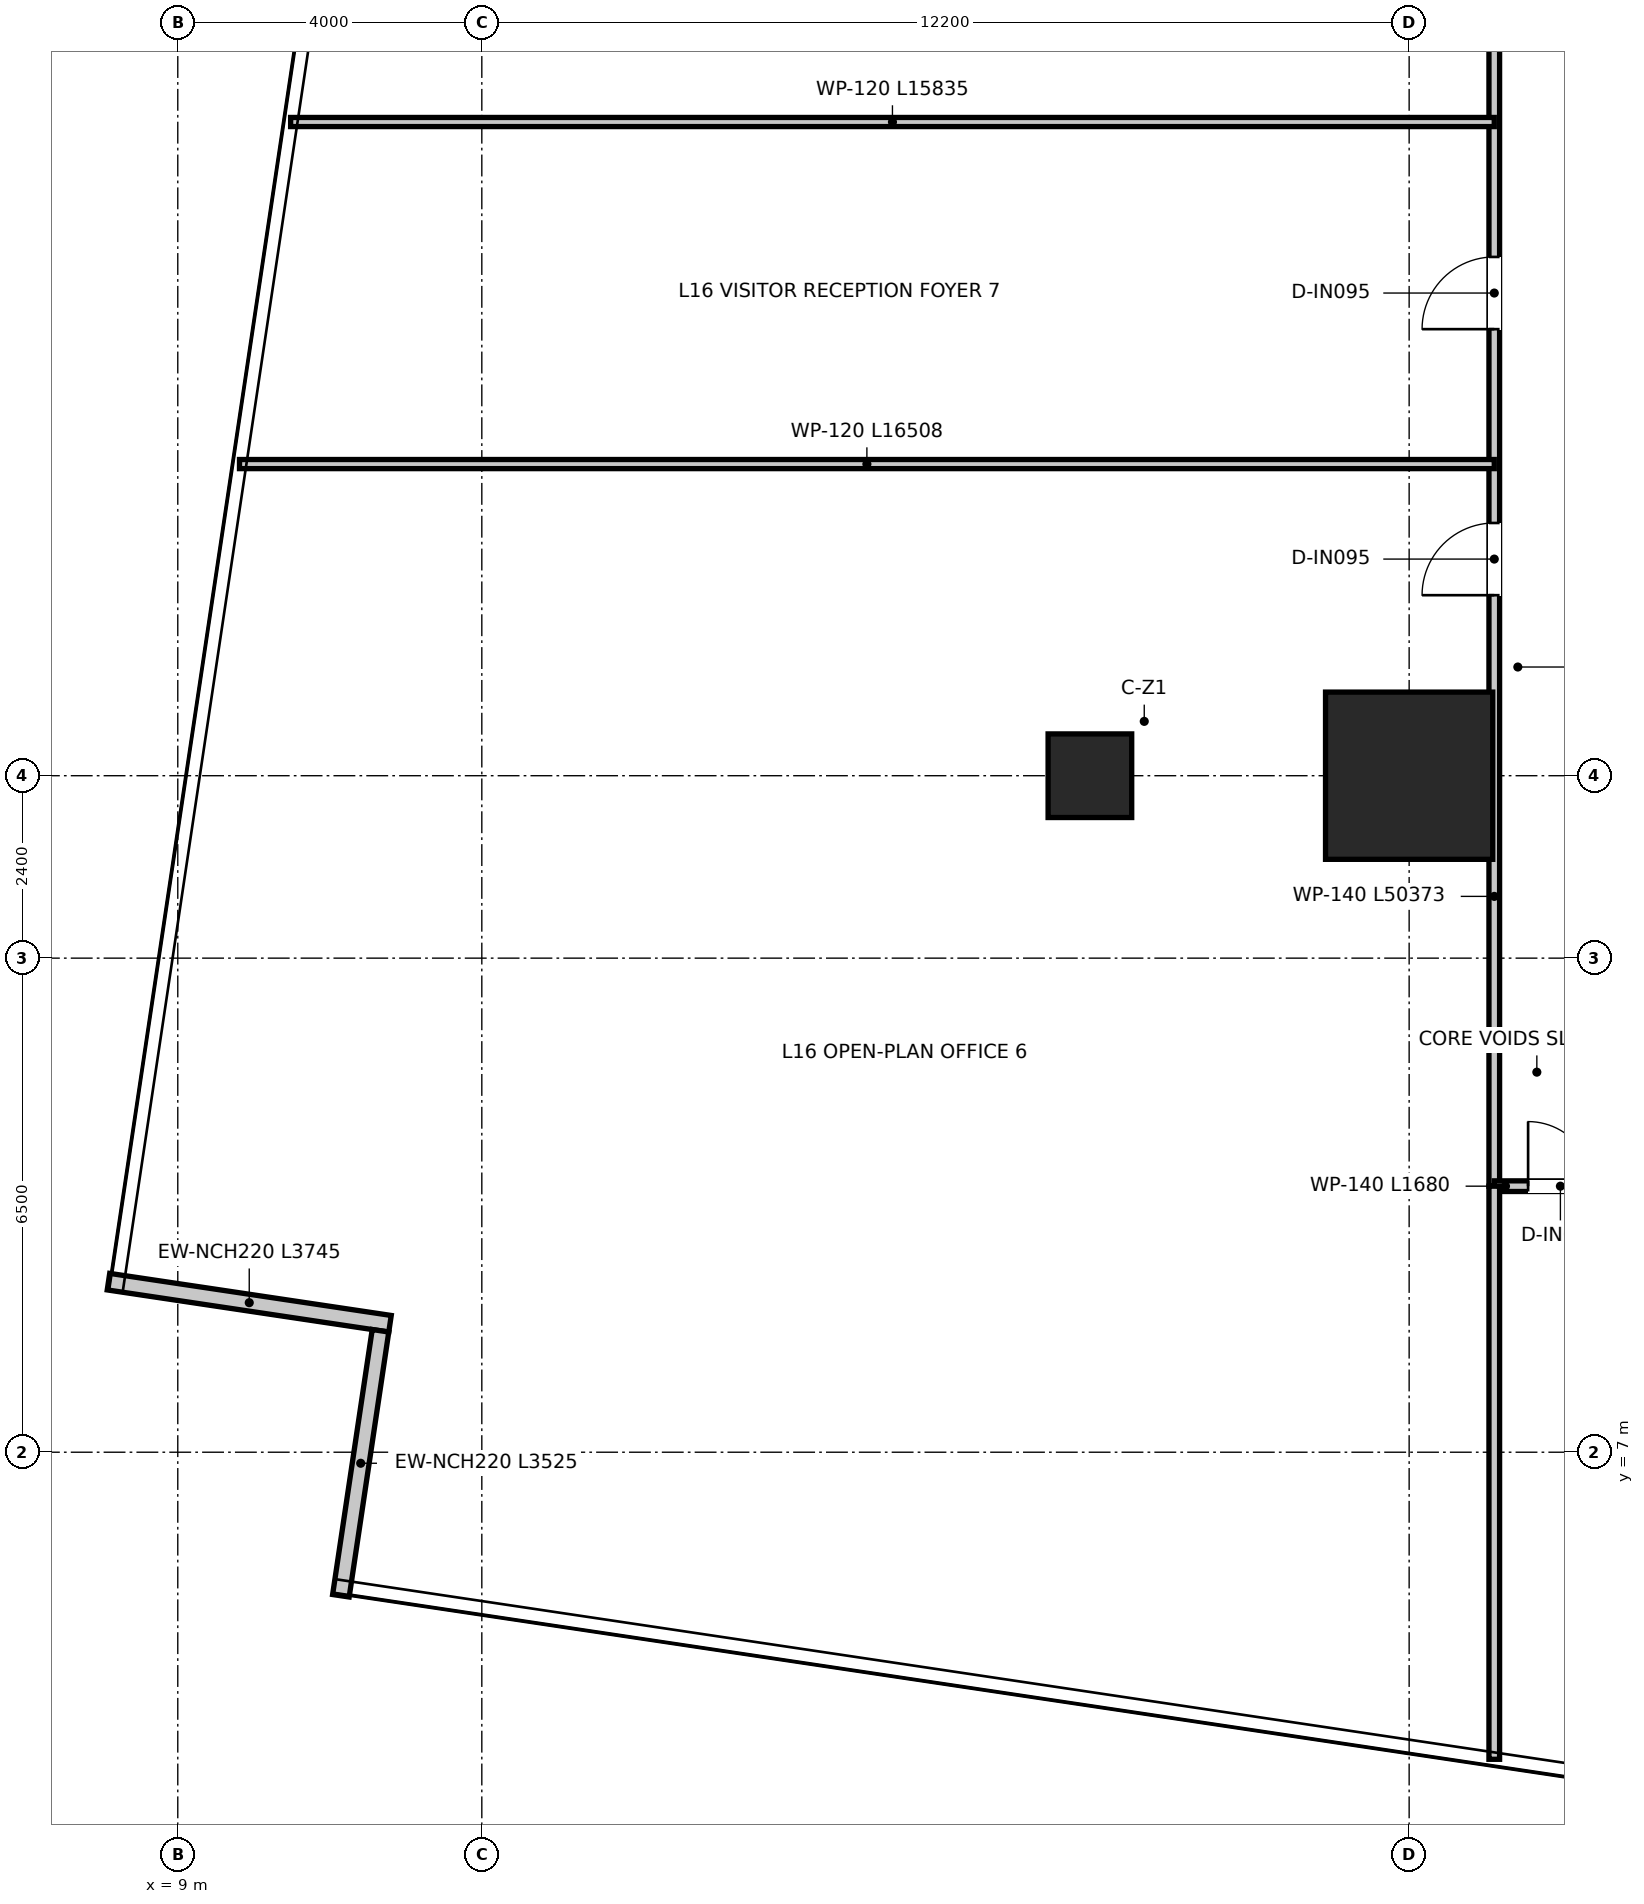
"""IFC4 building model, lengths in metres.
Left out: names, types, materials, properties, quantities, classifications, styles, units other than length and angle.
Written with IfcOpenShell. Run it as: python <this file> out.ifc"""

import sys

from ifc_helpers import new_model, si_unit, direction, frame, frame_2d, origin, origin_2d, place, context, subcontext, project, spatial, rectangle, extrude, source, transform, mapped, element, fill, save


model = new_model("IFC4")
c1 = context("Model", 3, precision=1e-05, world=origin(), true_north=direction((0.0, 1.0)))
c2 = subcontext(c1, "Body", "Model", "MODEL_VIEW")
j1 = project(units=[si_unit("LENGTHUNIT", "METRE"), si_unit("PLANEANGLEUNIT", "RADIAN")], contexts=[c1])
p1 = place(None, origin())
s1 = spatial("IfcSite", under=j1, at=p1, CompositionType="ELEMENT")
p2 = place(p1, origin())
s2 = spatial("IfcBuilding", under=s1, at=p2, CompositionType="ELEMENT")
p3 = place(p2, frame((0.0, 0.0, 68.45)))
s3 = spatial("IfcBuildingStorey", under=s2, at=p3, CompositionType="ELEMENT", Elevation=68.45)
m1 = source(origin(), c2, "Body", "SweptSolid", [
    extrude(rectangle(XDim=2.2, YDim=2.2, at=origin_2d()), origin(), (0.0, 0.0, 1.0), 3.95),
])
p4 = place(p3, frame((25.2, 15.9, 0.0), z_axis=(0.0, 0.0, 1.0), x_axis=(1.0, 0.0, 0.0)))
e1 = element("IfcColumn", 1, at=p4, inside=s3, PredefinedType="USERDEFINED", context=c2, shape_type="MappedRepresentation", body=[
    mapped(m1, transform((0.0, 0.0, 0.0), x_axis=(1.0, 0.0, 0.0), y_axis=(0.0, 1.0, 0.0), z_axis=(0.0, 0.0, 1.0), scale=1.0)),
])
m2 = source(origin(), c2, "Body", "SweptSolid", [
    extrude(rectangle(XDim=1.1, YDim=1.1, at=origin_2d()), origin(), (0.0, 0.0, 1.0), 3.95),
])
p5 = place(p3, frame((21.0, 15.9, 0.0), z_axis=(0.0, 0.0, 1.0), x_axis=(1.0, 0.0, 0.0)))
e2 = element("IfcColumn", 2, at=p5, inside=s3, PredefinedType="COLUMN", context=c2, shape_type="MappedRepresentation", body=[
    mapped(m2, transform((0.0, 0.0, 0.0), x_axis=(1.0, 0.0, 0.0), y_axis=(0.0, 1.0, 0.0), z_axis=(0.0, 0.0, 1.0), scale=1.0)),
])
p6 = place(p3, frame((8.088, 9.244, 0.0), z_axis=(0.0, 0.0, 1.0), x_axis=(0.989018923648, -0.147788932826, 0.0)))
e3 = element("IfcWall", 3, at=p6, inside=s3, PredefinedType="ELEMENTEDWALL", context=c2, shape_type="SweptSolid", body=[
    extrude(rectangle(XDim=3.745, YDim=0.22, at=frame_2d((1.873, 0.0))), origin(), (0.0, 0.0, 1.0), 3.67),
])
p7 = place(p3, frame((11.667, 8.598, 0.0), z_axis=(0.0, 0.0, 1.0), x_axis=(-0.147798551521, -0.98901748628, 0.0)))
e4 = element("IfcWall", 4, at=p7, inside=s3, PredefinedType="ELEMENTEDWALL", context=c2, shape_type="SweptSolid", body=[
    extrude(rectangle(XDim=3.525, YDim=0.22, at=frame_2d((1.763, 0.0))), origin(), (0.0, 0.0, 1.0), 3.67),
])
p8 = place(p3, frame((26.32, 10.5, 0.0), z_axis=(0.0, 0.0, 1.0), x_axis=(0.0, 1.0, 0.0)))
e5 = element("IfcWall", 5, at=p8, inside=s3, PredefinedType="PARTITIONING", context=c2, shape_type="SweptSolid", body=[
    extrude(rectangle(XDim=25.62, YDim=0.14, at=frame_2d((12.81, 0.0))), origin(), (0.0, 0.0, 1.0), 2.97),
])
p9 = place(p8, frame((7.775, 0.0, 0.0)))
e6 = element("IfcOpeningElement", 6, at=p9, cuts=e5, PredefinedType="OPENING", context=c2, shape_type="SweptSolid", body=[
    extrude(rectangle(XDim=0.95, YDim=2.1, at=frame_2d((0.475, 1.05))), frame((0.0, 0.08, 0.0), z_axis=(0.0, -1.0, 0.0), x_axis=(1.0, 0.0, 0.0)), (0.0, 0.0, 1.0), 0.16),
])
p10 = place(p8, frame((11.275, 0.0, 0.0)))
e7 = element("IfcOpeningElement", 7, at=p10, cuts=e5, PredefinedType="OPENING", context=c2, shape_type="SweptSolid", body=[
    extrude(rectangle(XDim=0.95, YDim=2.1, at=frame_2d((0.475, 1.05))), frame((0.0, 0.08, 0.0), z_axis=(0.0, -1.0, 0.0), x_axis=(1.0, 0.0, 0.0)), (0.0, 0.0, 1.0), 0.16),
])
p11 = place(p8, frame((15.775, 0.0, 0.0)))
e8 = element("IfcOpeningElement", 8, at=p11, cuts=e5, PredefinedType="OPENING", context=c2, shape_type="SweptSolid", body=[
    extrude(rectangle(XDim=0.95, YDim=2.1, at=frame_2d((0.475, 1.05))), frame((0.0, 0.08, 0.0), z_axis=(0.0, -1.0, 0.0), x_axis=(1.0, 0.0, 0.0)), (0.0, 0.0, 1.0), 0.16),
])
p12 = place(p8, frame((20.125, 0.0, 0.0)))
e9 = element("IfcOpeningElement", 9, at=p12, cuts=e5, PredefinedType="OPENING", context=c2, shape_type="SweptSolid", body=[
    extrude(rectangle(XDim=0.95, YDim=2.1, at=frame_2d((0.475, 1.05))), frame((0.0, 0.08, 0.0), z_axis=(0.0, -1.0, 0.0), x_axis=(1.0, 0.0, 0.0)), (0.0, 0.0, 1.0), 0.16),
])
p13 = place(p8, frame((22.975, 0.0, 0.0)))
e10 = element("IfcOpeningElement", 10, at=p13, cuts=e5, PredefinedType="OPENING", context=c2, shape_type="SweptSolid", body=[
    extrude(rectangle(XDim=0.95, YDim=2.1, at=frame_2d((0.475, 1.05))), frame((0.0, 0.08, 0.0), z_axis=(0.0, -1.0, 0.0), x_axis=(1.0, 0.0, 0.0)), (0.0, 0.0, 1.0), 0.16),
])
p14 = place(p3, frame((26.32, 10.5, 0.0), z_axis=(0.0, 0.0, 1.0), x_axis=(1.0, 0.0, 0.0)))
e11 = element("IfcWall", 11, at=p14, inside=s3, PredefinedType="PARTITIONING", context=c2, shape_type="SweptSolid", body=[
    extrude(rectangle(XDim=1.68, YDim=0.14, at=frame_2d((0.84, 0.0))), origin(), (0.0, 0.0, 1.0), 3.67),
])
p15 = place(p14, frame((0.445, 0.0, 0.0)))
e12 = element("IfcOpeningElement", 12, at=p15, cuts=e11, PredefinedType="OPENING", context=c2, shape_type="SweptSolid", body=[
    extrude(rectangle(XDim=0.85, YDim=2.1, at=frame_2d((0.425, 1.05))), frame((0.0, 0.08, 0.0), z_axis=(0.0, -1.0, 0.0), x_axis=(1.0, 0.0, 0.0)), (0.0, 0.0, 1.0), 0.16),
])
p16 = place(p3, frame((26.32, 2.96, 0.0), z_axis=(0.0, 0.0, 1.0), x_axis=(0.0, 1.0, 0.0)))
e13 = element("IfcWall", 13, at=p16, inside=s3, PredefinedType="PARTITIONING", context=c2, shape_type="SweptSolid", body=[
    extrude(rectangle(XDim=7.54, YDim=0.14, at=frame_2d((3.77, 0.0))), origin(), (0.0, 0.0, 1.0), 3.67),
])
p17 = place(p3, frame((9.812, 20.0, 0.0), z_axis=(0.0, 0.0, 1.0), x_axis=(1.0, 0.0, 0.0)))
e14 = element("IfcWall", 14, at=p17, inside=s3, PredefinedType="PARTITIONING", context=c2, shape_type="SweptSolid", body=[
    extrude(rectangle(XDim=16.508, YDim=0.12, at=frame_2d((8.254, 0.0))), origin(), (0.0, 0.0, 1.0), 2.97),
])
p18 = place(p3, frame((10.485, 24.5, 0.0), z_axis=(0.0, 0.0, 1.0), x_axis=(1.0, 0.0, 0.0)))
e15 = element("IfcWall", 15, at=p18, inside=s3, PredefinedType="PARTITIONING", context=c2, shape_type="SweptSolid", body=[
    extrude(rectangle(XDim=15.835, YDim=0.12, at=frame_2d((7.918, 0.0))), origin(), (0.0, 0.0, 1.0), 2.97),
])
p19 = place(p9, origin())
e16 = element("IfcDoor", 16, at=p19, inside=s3, OperationType="SINGLE_SWING_LEFT", PredefinedType="DOOR", context=c2, shape_type="SweptSolid", body=[
    extrude(rectangle(XDim=0.95, YDim=2.1, at=frame_2d((0.475, 1.05))), frame((0.0, 0.025, 0.0), z_axis=(0.0, -1.0, 0.0), x_axis=(1.0, 0.0, 0.0)), (0.0, 0.0, 1.0), 0.05),
])
fill(e6, e16)
p20 = place(p10, origin())
e17 = element("IfcDoor", 17, at=p20, inside=s3, OperationType="SINGLE_SWING_LEFT", PredefinedType="DOOR", context=c2, shape_type="SweptSolid", body=[
    extrude(rectangle(XDim=0.95, YDim=2.1, at=frame_2d((0.475, 1.05))), frame((0.0, 0.025, 0.0), z_axis=(0.0, -1.0, 0.0), x_axis=(1.0, 0.0, 0.0)), (0.0, 0.0, 1.0), 0.05),
])
fill(e7, e17)
p21 = place(p15, origin())
e18 = element("IfcDoor", 18, at=p21, inside=s3, OperationType="SINGLE_SWING_LEFT", PredefinedType="DOOR", context=c2, shape_type="SweptSolid", body=[
    extrude(rectangle(XDim=0.85, YDim=2.1, at=frame_2d((0.425, 1.05))), frame((0.0, 0.025, 0.0), z_axis=(0.0, -1.0, 0.0), x_axis=(1.0, 0.0, 0.0)), (0.0, 0.0, 1.0), 0.05),
])
fill(e12, e18)
save(model, sys.argv[1])
